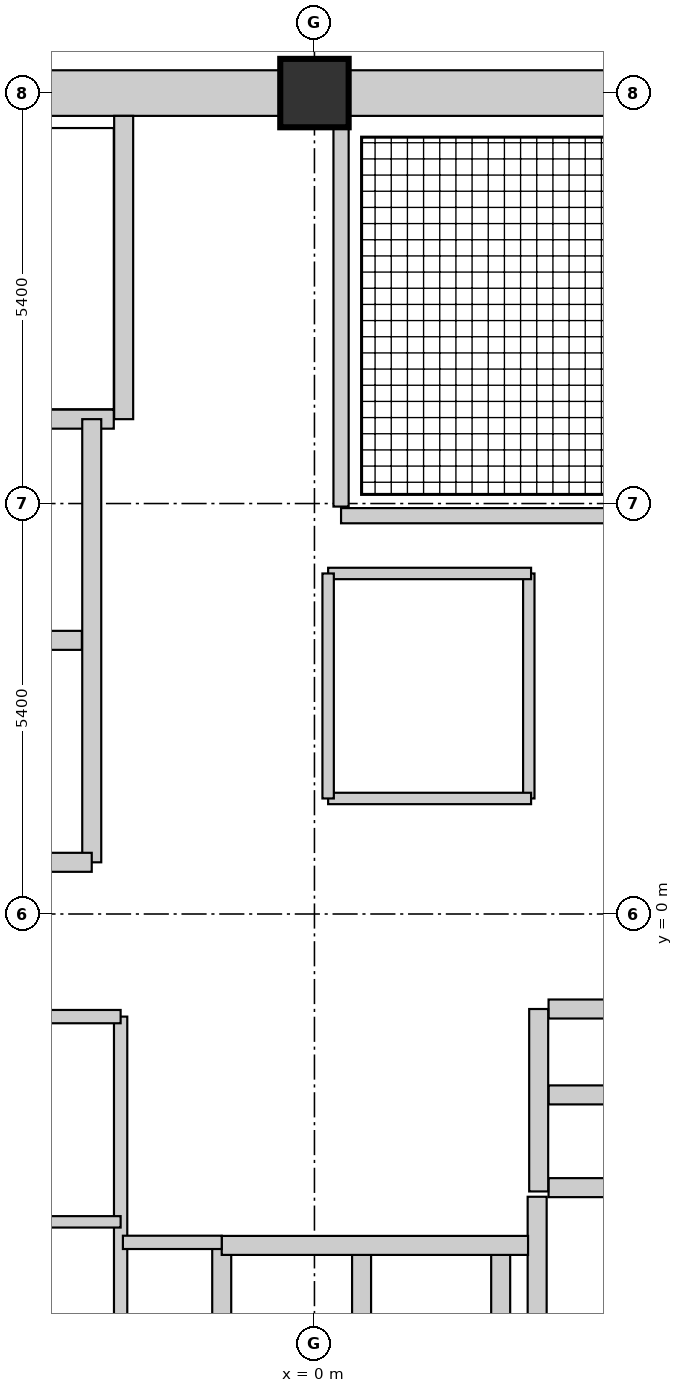
"""IFC4 building model, lengths in metres.
Left out: names, types, materials, properties, quantities, classifications, styles, units other than length and angle.
Written with IfcOpenShell. Run it as: python <this file> out.ifc"""

import sys

from ifc_helpers import new_model, si_unit, direction, frame, frame_2d, origin, origin_2d, place, context, subcontext, project, spatial, rectangle, extrude, element, fill, save


model = new_model("IFC4")
c1 = context("Model", 3, precision=1e-05, world=origin(), true_north=direction((0.0, 1.0)))
c2 = subcontext(c1, "Body", "Model", "MODEL_VIEW")
j1 = project(units=[si_unit("LENGTHUNIT", "METRE"), si_unit("PLANEANGLEUNIT", "RADIAN")], contexts=[c1])
p1 = place(None, origin())
s1 = spatial("IfcSite", under=j1, at=p1, CompositionType="ELEMENT")
p2 = place(p1, origin())
s2 = spatial("IfcBuilding", under=s1, at=p2, CompositionType="ELEMENT")
p3 = place(p2, frame((0.0, 0.0, 174.75)))
s3 = spatial("IfcBuildingStorey", under=s2, at=p3, CompositionType="ELEMENT", Elevation=174.75)
p4 = place(p3, frame((0.0, 10.8, 0.0), z_axis=(0.0, 0.0, 1.0), x_axis=(1.0, 0.0, 0.0)))
e1 = element("IfcColumn", 1, at=p4, inside=s3, PredefinedType="COLUMN", context=c2, shape_type="SweptSolid", body=[
    extrude(rectangle(XDim=0.9, YDim=0.9, at=origin_2d()), origin(), (0.0, 0.0, 1.0), 3.75),
])
p5 = place(p3, frame((-4.94, 10.8, 0.0), z_axis=(0.0, 0.0, 1.0), x_axis=(1.0, 0.0, 0.0)))
e2 = element("IfcWall", 2, at=p5, inside=s3, PredefinedType="SHEAR", context=c2, shape_type="SweptSolid", body=[
    extrude(rectangle(XDim=4.48, YDim=0.6, at=frame_2d((2.24, 0.0))), origin(), (0.0, 0.0, 1.0), 3.75),
])
p6 = place(p5, frame((3.13, 0.0, 0.0)))
e3 = element("IfcOpeningElement", 3, at=p6, cuts=e2, PredefinedType="OPENING", context=c2, shape_type="SweptSolid", body=[
    extrude(rectangle(XDim=1.1, YDim=2.1, at=frame_2d((0.55, 1.05))), frame((0.0, 0.31, 0.0), z_axis=(0.0, -1.0, 0.0), x_axis=(1.0, 0.0, 0.0)), (0.0, 0.0, 1.0), 0.62),
])
p7 = place(p3, frame((0.46, 10.8, 0.0), z_axis=(0.0, 0.0, 1.0), x_axis=(1.0, 0.0, 0.0)))
e4 = element("IfcWall", 4, at=p7, inside=s3, PredefinedType="SHEAR", context=c2, shape_type="SweptSolid", body=[
    extrude(rectangle(XDim=4.48, YDim=0.6, at=frame_2d((2.24, 0.0))), origin(), (0.0, 0.0, 1.0), 3.75),
])
p8 = place(p3, frame((2.93, -6.51, 0.0), z_axis=(0.0, 0.0, 1.0), x_axis=(0.0, 1.0, 0.0)))
e5 = element("IfcWall", 5, at=p8, inside=s3, PredefinedType="SHEAR", context=c2, shape_type="SweptSolid", body=[
    extrude(rectangle(XDim=2.79, YDim=0.25, at=frame_2d((1.395, 0.0))), origin(), (0.0, 0.0, 1.0), 3.75),
])
p9 = place(p3, frame((3.08, -3.6, 0.0), z_axis=(0.0, 0.0, 1.0), x_axis=(1.0, 0.0, 0.0)))
e6 = element("IfcWall", 6, at=p9, inside=s3, PredefinedType="SHEAR", context=c2, shape_type="SweptSolid", body=[
    extrude(rectangle(XDim=2.37, YDim=0.25, at=frame_2d((1.185, 0.0))), origin(), (0.0, 0.0, 1.0), 3.75),
])
for number, where, z_axis, x_axis in (
    (7, (0.62, -6.34, 0.0), (0.0, 0.0, 1.0), (0.0, 1.0, 0.0)),
    (8, (2.45, -6.34, 0.0), (0.0, 0.0, 1.0), (0.0, 1.0, 0.0)),
):
    element("IfcWall", number, at=place(p3, frame(where, z_axis=z_axis, x_axis=x_axis)), inside=s3, PredefinedType="SHEAR", context=c2, shape_type="SweptSolid", body=[
        extrude(rectangle(XDim=1.88, YDim=0.25, at=frame_2d((0.94, 0.0))), origin(), (0.0, 0.0, 1.0), 3.75),
    ])
p10 = place(p3, frame((-1.22, -6.44, 0.0), z_axis=(0.0, 0.0, 1.0), x_axis=(0.0, 1.0, 0.0)))
e9 = element("IfcWall", 9, at=p10, inside=s3, PredefinedType="SHEAR", context=c2, shape_type="SweptSolid", body=[
    extrude(rectangle(XDim=2.08, YDim=0.25, at=frame_2d((1.04, 0.0))), origin(), (0.0, 0.0, 1.0), 3.75),
])
p11 = place(p3, frame((-1.22, -4.36, 0.0), z_axis=(0.0, 0.0, 1.0), x_axis=(1.0, 0.0, 0.0)))
e10 = element("IfcWall", 10, at=p11, inside=s3, PredefinedType="SHEAR", context=c2, shape_type="SweptSolid", body=[
    extrude(rectangle(XDim=4.03, YDim=0.25, at=frame_2d((2.015, 0.0))), origin(), (0.0, 0.0, 1.0), 3.75),
])
for number, where, z_axis, x_axis in (
    (11, (3.08, -2.38, 0.0), (0.0, 0.0, 1.0), (1.0, 0.0, 0.0)),
    (12, (3.08, -1.25, 0.0), (0.0, 0.0, 1.0), (1.0, 0.0, 0.0)),
):
    element("IfcWall", number, at=place(p3, frame(where, z_axis=z_axis, x_axis=x_axis)), inside=s3, PredefinedType="SHEAR", context=c2, shape_type="SweptSolid", body=[
        extrude(rectangle(XDim=2.37, YDim=0.25, at=frame_2d((1.185, 0.0))), origin(), (0.0, 0.0, 1.0), 3.75),
    ])
p12 = place(p3, frame((2.95, -3.65, 0.0), z_axis=(0.0, 0.0, 1.0), x_axis=(0.0, 1.0, 0.0)))
e13 = element("IfcWall", 13, at=p12, inside=s3, PredefinedType="SHEAR", context=c2, shape_type="SweptSolid", body=[
    extrude(rectangle(XDim=2.4, YDim=0.25, at=frame_2d((1.2, 0.0))), origin(), (0.0, 0.0, 1.0), 3.75),
])
p13 = place(p12, frame((0.775, 0.0, 0.0)))
e14 = element("IfcOpeningElement", 14, at=p13, cuts=e13, PredefinedType="OPENING", context=c2, shape_type="SweptSolid", body=[
    extrude(rectangle(XDim=0.85, YDim=2.1, at=frame_2d((0.425, 1.05))), frame((0.0, 0.135, 0.0), z_axis=(0.0, -1.0, 0.0), x_axis=(1.0, 0.0, 0.0)), (0.0, 0.0, 1.0), 0.27),
])
p14 = place(p3, frame((-2.51, 6.51, 0.0), z_axis=(0.0, 0.0, 1.0), x_axis=(0.0, 1.0, 0.0)))
e15 = element("IfcWall", 15, at=p14, inside=s3, PredefinedType="SHEAR", context=c2, shape_type="SweptSolid", body=[
    extrude(rectangle(XDim=3.99, YDim=0.25, at=frame_2d((1.995, 0.0))), origin(), (0.0, 0.0, 1.0), 3.75),
])
p15 = place(p3, frame((-10.34, 6.51, 0.0), z_axis=(0.0, 0.0, 1.0), x_axis=(1.0, 0.0, 0.0)))
e16 = element("IfcWall", 16, at=p15, inside=s3, PredefinedType="SHEAR", context=c2, shape_type="SweptSolid", body=[
    extrude(rectangle(XDim=7.7, YDim=0.25, at=frame_2d((3.85, 0.0))), origin(), (0.0, 0.0, 1.0), 3.75),
])
p16 = place(p15, frame((0.35, 0.0, 0.0)))
e17 = element("IfcOpeningElement", 17, at=p16, cuts=e16, PredefinedType="OPENING", context=c2, shape_type="SweptSolid", body=[
    extrude(rectangle(XDim=1.1, YDim=2.1, at=frame_2d((0.55, 1.05))), frame((0.0, 0.135, 0.0), z_axis=(0.0, -1.0, 0.0), x_axis=(1.0, 0.0, 0.0)), (0.0, 0.0, 1.0), 0.27),
])
p17 = place(p3, frame((-2.93, 0.68, 0.0), z_axis=(0.0, 0.0, 1.0), x_axis=(0.0, 1.0, 0.0)))
e18 = element("IfcWall", 18, at=p17, inside=s3, PredefinedType="SHEAR", context=c2, shape_type="SweptSolid", body=[
    extrude(rectangle(XDim=5.83, YDim=0.25, at=frame_2d((2.915, 0.0))), origin(), (0.0, 0.0, 1.0), 3.75),
])
p18 = place(p17, frame((0.75, 0.0, 0.0)))
e19 = element("IfcOpeningElement", 19, at=p18, cuts=e18, PredefinedType="OPENING", context=c2, shape_type="SweptSolid", body=[
    extrude(rectangle(XDim=1.2, YDim=2.1, at=frame_2d((0.6, 1.05))), frame((0.0, 0.135, 0.0), z_axis=(0.0, -1.0, 0.0), x_axis=(1.0, 0.0, 0.0)), (0.0, 0.0, 1.0), 0.27),
])
p19 = place(p3, frame((-5.45, 3.6, 0.0), z_axis=(0.0, 0.0, 1.0), x_axis=(1.0, 0.0, 0.0)))
e20 = element("IfcWall", 20, at=p19, inside=s3, PredefinedType="SHEAR", context=c2, shape_type="SweptSolid", body=[
    extrude(rectangle(XDim=2.39, YDim=0.25, at=frame_2d((1.195, 0.0))), origin(), (0.0, 0.0, 1.0), 3.75),
])
p20 = place(p3, frame((-5.58, 0.68, 0.0), z_axis=(0.0, 0.0, 1.0), x_axis=(1.0, 0.0, 0.0)))
e21 = element("IfcWall", 21, at=p20, inside=s3, PredefinedType="SHEAR", context=c2, shape_type="SweptSolid", body=[
    extrude(rectangle(XDim=2.65, YDim=0.25, at=frame_2d((1.325, 0.0))), origin(), (0.0, 0.0, 1.0), 3.75),
])
p21 = place(p3, frame((2.82, 1.52, 0.0), z_axis=(0.0, 0.0, 1.0), x_axis=(0.0, 1.0, 0.0)))
e22 = element("IfcWall", 22, at=p21, inside=s3, PredefinedType="PARTITIONING", context=c2, shape_type="SweptSolid", body=[
    extrude(rectangle(XDim=2.96, YDim=0.15, at=frame_2d((1.48, 0.0))), origin(), (0.0, 0.0, 1.0), 3.57),
])
for number, where, z_axis, x_axis in (
    (23, (0.18, 4.48, 0.0), (0.0, 0.0, 1.0), (1.0, 0.0, 0.0)),
    (24, (0.18, 1.52, 0.0), (0.0, 0.0, 1.0), (1.0, 0.0, 0.0)),
):
    element("IfcWall", number, at=place(p3, frame(where, z_axis=z_axis, x_axis=x_axis)), inside=s3, PredefinedType="PARTITIONING", context=c2, shape_type="SweptSolid", body=[
        extrude(rectangle(XDim=2.67, YDim=0.15, at=frame_2d((1.335, 0.0))), origin(), (0.0, 0.0, 1.0), 3.57),
    ])
p22 = place(p3, frame((0.18, 1.52, 0.0), z_axis=(0.0, 0.0, 1.0), x_axis=(0.0, 1.0, 0.0)))
e25 = element("IfcWall", 25, at=p22, inside=s3, PredefinedType="PARTITIONING", context=c2, shape_type="SweptSolid", body=[
    extrude(rectangle(XDim=2.96, YDim=0.15, at=frame_2d((1.48, 0.0))), origin(), (0.0, 0.0, 1.0), 3.57),
])
p23 = place(p22, frame((0.95, 0.0, 0.0)))
e26 = element("IfcOpeningElement", 26, at=p23, cuts=e25, PredefinedType="OPENING", context=c2, shape_type="SweptSolid", body=[
    extrude(rectangle(XDim=0.85, YDim=2.1, at=frame_2d((0.425, 1.05))), frame((0.0, 0.085, 0.0), z_axis=(0.0, -1.0, 0.0), x_axis=(1.0, 0.0, 0.0)), (0.0, 0.0, 1.0), 0.17),
])
p24 = place(p3, frame((0.35, 5.24, 0.0), z_axis=(0.0, 0.0, 1.0), x_axis=(1.0, 0.0, 0.0)))
e27 = element("IfcWall", 27, at=p24, inside=s3, PredefinedType="PARTITIONING", context=c2, shape_type="SweptSolid", body=[
    extrude(rectangle(XDim=5.15, YDim=0.2, at=frame_2d((2.575, 0.0))), origin(), (0.0, 0.0, 1.0), 3.57),
])
p25 = place(p24, frame((0.8, 0.0, 0.0)))
e28 = element("IfcOpeningElement", 28, at=p25, cuts=e27, PredefinedType="OPENING", context=c2, shape_type="SweptSolid", body=[
    extrude(rectangle(XDim=1.1, YDim=2.1, at=frame_2d((0.55, 1.05))), frame((0.0, 0.11, 0.0), z_axis=(0.0, -1.0, 0.0), x_axis=(1.0, 0.0, 0.0)), (0.0, 0.0, 1.0), 0.22),
])
p26 = place(p3, frame((0.35, 5.36, 0.0), z_axis=(0.0, 0.0, 1.0), x_axis=(0.0, 1.0, 0.0)))
e29 = element("IfcWall", 29, at=p26, inside=s3, PredefinedType="PARTITIONING", context=c2, shape_type="SweptSolid", body=[
    extrude(rectangle(XDim=4.98, YDim=0.2, at=frame_2d((2.49, 0.0))), origin(), (0.0, 0.0, 1.0), 3.57),
])
p27 = place(p3, frame((-2.55, -6.51, 0.0), z_axis=(0.0, 0.0, 1.0), x_axis=(0.0, 1.0, 0.0)))
e30 = element("IfcWall", 30, at=p27, inside=s3, PredefinedType="PARTITIONING", context=c2, shape_type="SweptSolid", body=[
    extrude(rectangle(XDim=5.16, YDim=0.175, at=frame_2d((2.58, 0.0))), origin(), (0.0, 0.0, 1.0), 3.57),
])
p28 = place(p27, frame((3.3, 0.0, 0.0)))
e31 = element("IfcOpeningElement", 31, at=p28, cuts=e30, PredefinedType="OPENING", context=c2, shape_type="SweptSolid", body=[
    extrude(rectangle(XDim=0.85, YDim=2.1, at=frame_2d((0.425, 1.05))), frame((0.0, 0.097, 0.0), z_axis=(0.0, -1.0, 0.0), x_axis=(1.0, 0.0, 0.0)), (0.0, 0.0, 1.0), 0.195),
])
p29 = place(p3, frame((-7.18, -4.05, 0.0), z_axis=(0.0, 0.0, 1.0), x_axis=(1.0, 0.0, 0.0)))
e32 = element("IfcWall", 32, at=p29, inside=s3, PredefinedType="PARTITIONING", context=c2, shape_type="SweptSolid", body=[
    extrude(rectangle(XDim=4.63, YDim=0.15, at=frame_2d((2.315, 0.0))), origin(), (0.0, 0.0, 1.0), 3.57),
])
p30 = place(p29, frame((1.0, 0.0, 0.0)))
e33 = element("IfcOpeningElement", 33, at=p30, cuts=e32, PredefinedType="OPENING", context=c2, shape_type="SweptSolid", body=[
    extrude(rectangle(XDim=0.85, YDim=2.1, at=frame_2d((0.425, 1.05))), frame((0.0, 0.085, 0.0), z_axis=(0.0, -1.0, 0.0), x_axis=(1.0, 0.0, 0.0)), (0.0, 0.0, 1.0), 0.17),
])
p31 = place(p3, frame((-7.18, -1.35, 0.0), z_axis=(0.0, 0.0, 1.0), x_axis=(1.0, 0.0, 0.0)))
e34 = element("IfcWall", 34, at=p31, inside=s3, PredefinedType="PARTITIONING", context=c2, shape_type="SweptSolid", body=[
    extrude(rectangle(XDim=4.63, YDim=0.175, at=frame_2d((2.315, 0.0))), origin(), (0.0, 0.0, 1.0), 3.57),
])
p32 = place(p3, frame((-2.52, -4.32, 0.0), z_axis=(0.0, 0.0, 1.0), x_axis=(1.0, 0.0, 0.0)))
e35 = element("IfcWall", 35, at=p32, inside=s3, PredefinedType="PARTITIONING", context=c2, shape_type="SweptSolid", body=[
    extrude(rectangle(XDim=1.3, YDim=0.175, at=frame_2d((0.65, 0.0))), origin(), (0.0, 0.0, 1.0), 3.57),
])
p33 = place(p32, frame((0.22, 0.0, 0.0)))
e36 = element("IfcOpeningElement", 36, at=p33, cuts=e35, PredefinedType="OPENING", context=c2, shape_type="SweptSolid", body=[
    extrude(rectangle(XDim=0.85, YDim=2.1, at=frame_2d((0.425, 1.05))), frame((0.0, 0.097, 0.0), z_axis=(0.0, -1.0, 0.0), x_axis=(1.0, 0.0, 0.0)), (0.0, 0.0, 1.0), 0.195),
])
p34 = place(p23, origin())
e37 = element("IfcDoor", 37, at=p34, inside=s3, OperationType="SINGLE_SWING_RIGHT", PredefinedType="DOOR", context=c2, shape_type="SweptSolid", body=[
    extrude(rectangle(XDim=0.85, YDim=2.1, at=frame_2d((0.425, 1.05))), frame((0.0, 0.025, 0.0), z_axis=(0.0, -1.0, 0.0), x_axis=(1.0, 0.0, 0.0)), (0.0, 0.0, 1.0), 0.05),
])
fill(e26, e37)
p35 = place(p13, origin())
e38 = element("IfcDoor", 38, at=p35, inside=s3, OperationType="SINGLE_SWING_LEFT", PredefinedType="DOOR", context=c2, shape_type="SweptSolid", body=[
    extrude(rectangle(XDim=0.85, YDim=2.1, at=frame_2d((0.425, 1.05))), frame((0.0, 0.025, 0.0), z_axis=(0.0, -1.0, 0.0), x_axis=(1.0, 0.0, 0.0)), (0.0, 0.0, 1.0), 0.05),
])
fill(e14, e38)
p36 = place(p6, origin())
e39 = element("IfcDoor", 39, at=p36, inside=s3, OperationType="SINGLE_SWING_LEFT", PredefinedType="DOOR", context=c2, shape_type="SweptSolid", body=[
    extrude(rectangle(XDim=1.1, YDim=2.1, at=frame_2d((0.55, 1.05))), frame((0.0, 0.025, 0.0), z_axis=(0.0, -1.0, 0.0), x_axis=(1.0, 0.0, 0.0)), (0.0, 0.0, 1.0), 0.05),
])
fill(e3, e39)
p37 = place(p18, origin())
e40 = element("IfcDoor", 40, at=p37, inside=s3, OperationType="SLIDING_TO_LEFT", PredefinedType="DOOR", context=c2, shape_type="SweptSolid", body=[
    extrude(rectangle(XDim=1.2, YDim=2.1, at=frame_2d((0.6, 1.05))), frame((0.0, 0.025, 0.0), z_axis=(0.0, -1.0, 0.0), x_axis=(1.0, 0.0, 0.0)), (0.0, 0.0, 1.0), 0.05),
])
fill(e19, e40)
p38 = place(p25, origin())
e41 = element("IfcDoor", 41, at=p38, inside=s3, OperationType="SINGLE_SWING_LEFT", PredefinedType="DOOR", context=c2, shape_type="SweptSolid", body=[
    extrude(rectangle(XDim=1.1, YDim=2.1, at=frame_2d((0.55, 1.05))), frame((0.0, 0.025, 0.0), z_axis=(0.0, -1.0, 0.0), x_axis=(1.0, 0.0, 0.0)), (0.0, 0.0, 1.0), 0.05),
])
fill(e28, e41)
p39 = place(p33, origin())
e42 = element("IfcDoor", 42, at=p39, inside=s3, OperationType="SINGLE_SWING_LEFT", PredefinedType="DOOR", context=c2, shape_type="SweptSolid", body=[
    extrude(rectangle(XDim=0.85, YDim=2.1, at=frame_2d((0.425, 1.05))), frame((0.0, 0.025, 0.0), z_axis=(0.0, -1.0, 0.0), x_axis=(1.0, 0.0, 0.0)), (0.0, 0.0, 1.0), 0.05),
])
fill(e36, e42)
p40 = place(p28, origin())
e43 = element("IfcDoor", 43, at=p40, inside=s3, OperationType="SINGLE_SWING_LEFT", PredefinedType="DOOR", context=c2, shape_type="SweptSolid", body=[
    extrude(rectangle(XDim=0.85, YDim=2.1, at=frame_2d((0.425, 1.05))), frame((0.0, 0.025, 0.0), z_axis=(0.0, -1.0, 0.0), x_axis=(1.0, 0.0, 0.0)), (0.0, 0.0, 1.0), 0.05),
])
fill(e31, e43)
save(model, sys.argv[1])
